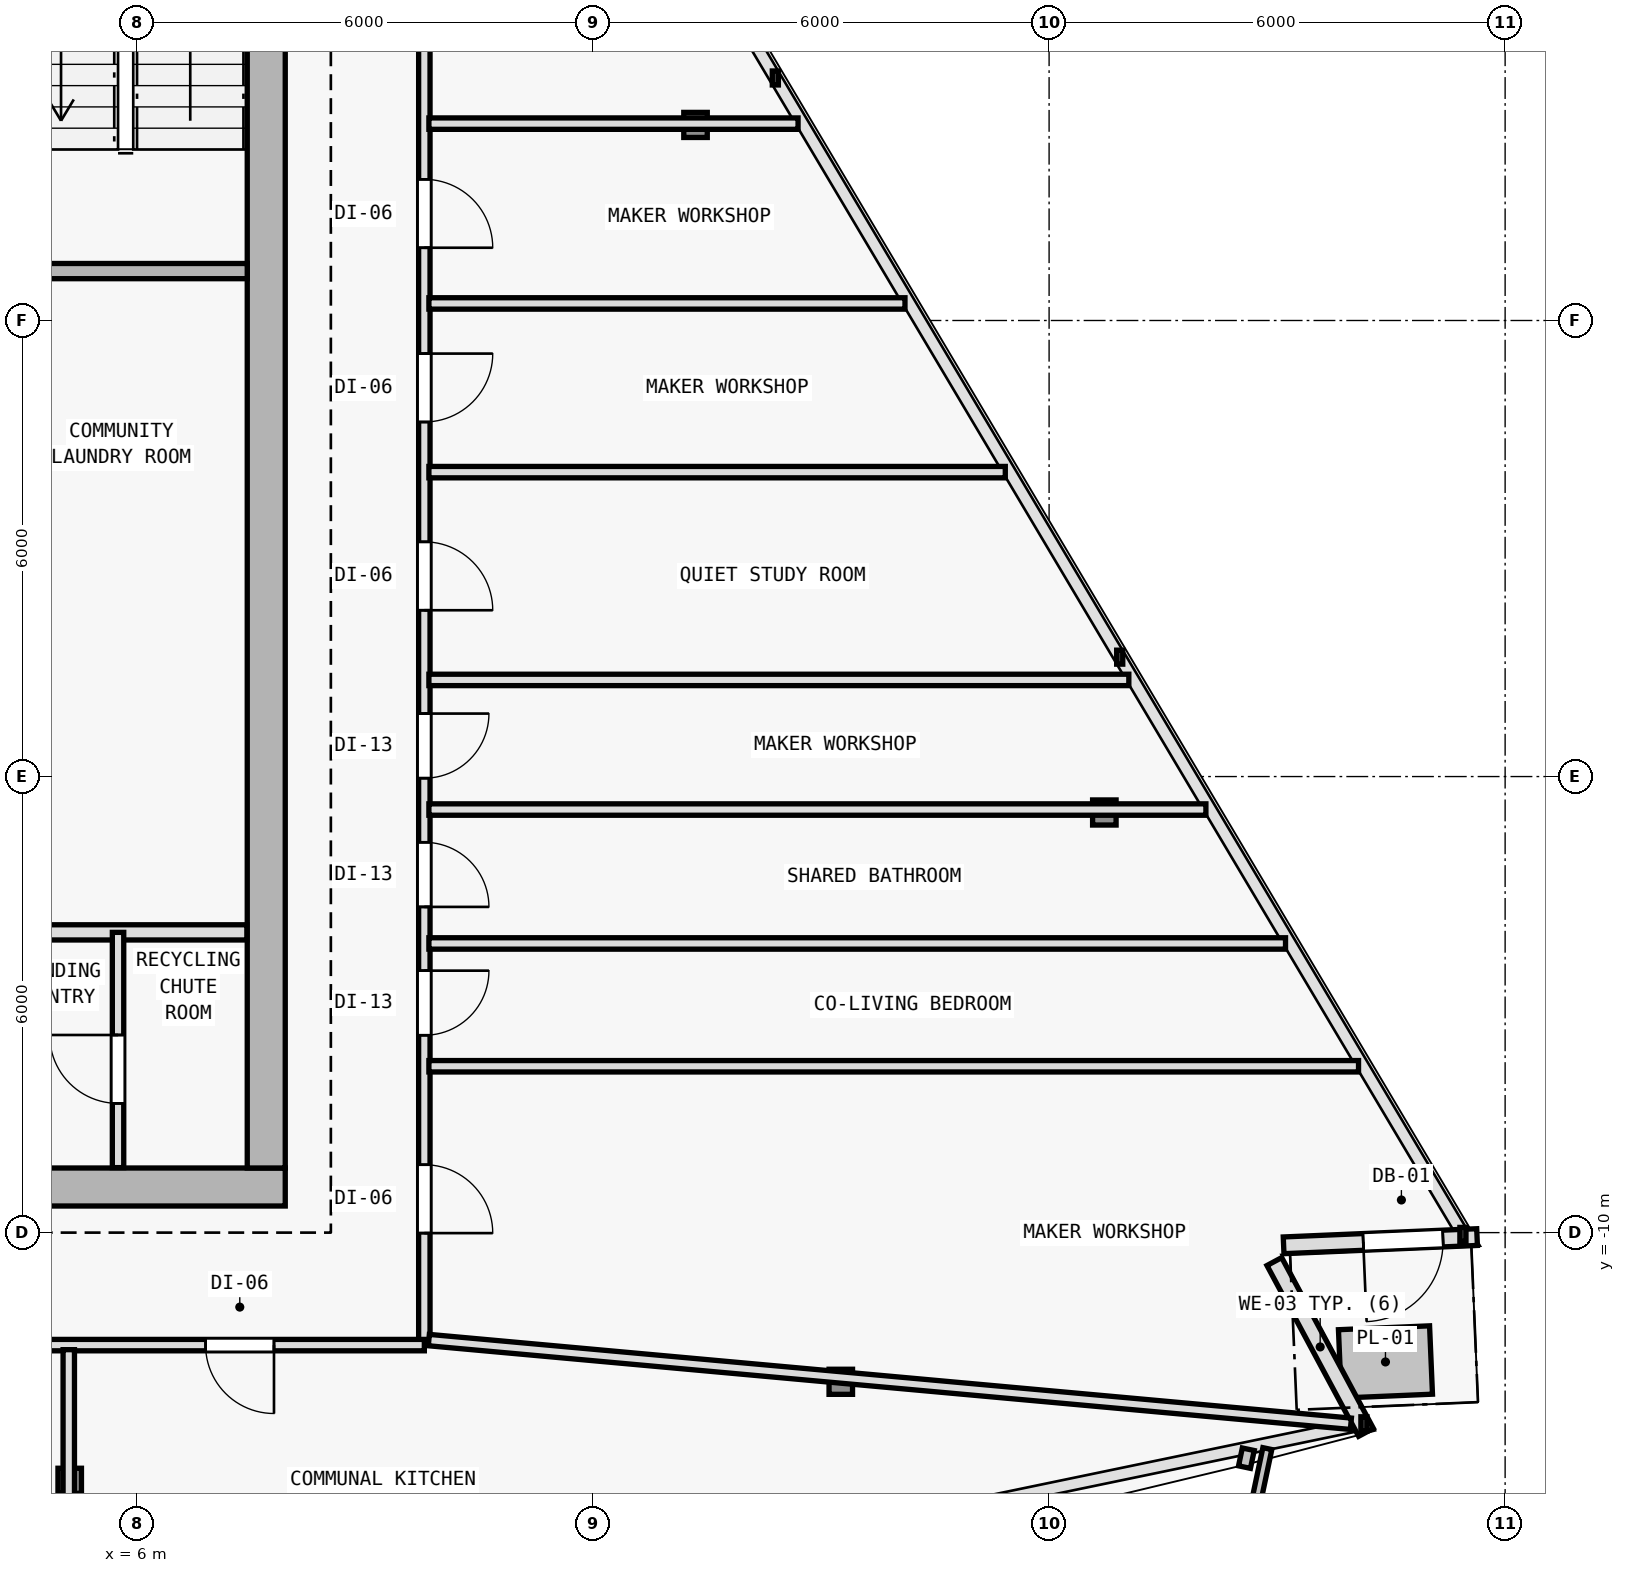
"""IFC4 building model, lengths in metres.
Left out: names, types, materials, properties, quantities, classifications, styles, units other than length and angle.
Written with IfcOpenShell. Run it as: python <this file> out.ifc"""

import sys

from ifc_helpers import new_model, si_unit, direction, frame, frame_2d, origin, origin_2d, place, context, subcontext, project, spatial, rectangle, i_section, extrude, element, fill, save


model = new_model("IFC4")
c1 = context("Model", 3, precision=1e-05, world=origin(), true_north=direction((0.0, 1.0)))
c2 = subcontext(c1, "Body", "Model", "MODEL_VIEW")
j1 = project(units=[si_unit("LENGTHUNIT", "METRE"), si_unit("PLANEANGLEUNIT", "RADIAN")], contexts=[c1])
p1 = place(None, origin())
s1 = spatial("IfcSite", under=j1, at=p1, CompositionType="ELEMENT")
p2 = place(p1, origin())
s2 = spatial("IfcBuilding", under=s1, at=p2, CompositionType="ELEMENT")
p3 = place(p2, frame((0.0, 0.0, 283.2)))
s3 = spatial("IfcBuildingStorey", under=s2, at=p3, CompositionType="ELEMENT", Elevation=283.2)
for number, where, z_axis, x_axis in (
    (1, (7.7, -9.4, 0.0), (0.0, 0.0, 1.0), (1.0, 0.0, 0.0)),
    (2, (7.7, 0.4, 0.0), (0.0, 0.0, 1.0), (1.0, 0.0, 0.0)),
):
    element("IfcColumn", number, at=place(p3, frame(where, z_axis=z_axis, x_axis=x_axis)), inside=s3, PredefinedType="COLUMN", context=c2, shape_type="SweptSolid", body=[
        extrude(i_section(OverallWidth=0.374, OverallDepth=0.372, WebThickness=0.012, FlangeThickness=0.02, FilletRadius=0.015, at=origin_2d()), origin(), (0.0, 0.0, 1.0), 3.6),
    ])
p4 = place(p3, frame((5.114, -13.265, 0.006), z_axis=(-0.006934304776, 0.03521539092, 0.999355688261), x_axis=(-0.981159154887, -0.193201223549, 0.0)))
e3 = element("IfcColumn", 3, at=p4, inside=s3, PredefinedType="COLUMN", context=c2, shape_type="SweptSolid", body=[
    extrude(i_section(OverallWidth=0.309, OverallDepth=0.33, WebThickness=0.011, FlangeThickness=0.019, FilletRadius=0.027, at=origin_2d()), origin(), (0.0, 0.0, 1.0), 3.591),
])
p5 = place(p3, frame((15.259, -11.962, 0.006), z_axis=(-0.020596292833, 0.033511459955, 0.999226087917), x_axis=(-0.851954850327, -0.523615252838, 0.0)))
e4 = element("IfcColumn", 4, at=p5, inside=s3, PredefinedType="COLUMN", context=c2, shape_type="SweptSolid", body=[
    extrude(i_section(OverallWidth=0.309, OverallDepth=0.33, WebThickness=0.011, FlangeThickness=0.019, FilletRadius=0.027, at=origin_2d()), origin(), (0.0, 0.0, 1.0), 3.592),
])
p6 = place(p3, frame((18.727, -4.473, 0.006), z_axis=(-0.026107436898, 0.021620221181, 0.999425318758), x_axis=(-0.637813971185, -0.770190455771, 0.0)))
e5 = element("IfcColumn", 5, at=p6, inside=s3, PredefinedType="COLUMN", context=c2, shape_type="SweptSolid", body=[
    extrude(i_section(OverallWidth=0.309, OverallDepth=0.33, WebThickness=0.011, FlangeThickness=0.019, FilletRadius=0.027, at=origin_2d()), origin(), (0.0, 0.0, 1.0), 3.591),
])
p7 = place(p3, frame((13.348, 4.573, 0.006), z_axis=(-0.018907326549, 0.00952167524, 0.999775900241), x_axis=(-0.449781931574, -0.893138406984, 0.0)))
e6 = element("IfcColumn", 6, at=p7, inside=s3, PredefinedType="COLUMN", context=c2, shape_type="SweptSolid", body=[
    extrude(i_section(OverallWidth=0.309, OverallDepth=0.33, WebThickness=0.011, FlangeThickness=0.019, FilletRadius=0.027, at=origin_2d()), origin(), (0.0, 0.0, 1.0), 3.59),
])
p8 = place(p3, frame((20.964, -10.381, 0.0), z_axis=(0.0, 0.0, 1.0), x_axis=(0.472728849632, -0.881207940685, 0.0)))
e7 = element("IfcWall", 7, at=p8, inside=s3, PredefinedType="SOLIDWALL", context=c2, shape_type="SweptSolid", body=[
    extrude(rectangle(XDim=2.55, YDim=0.22, at=frame_2d((1.275, 0.0))), origin(), (0.0, 0.0, 1.0), 3.35),
])
p9 = place(p3, frame((23.631, -10.059, 0.0), z_axis=(0.0, 0.0, 1.0), x_axis=(-0.999098350703, -0.042455690107, 0.0)))
e8 = element("IfcWall", 8, at=p9, inside=s3, PredefinedType="SOLIDWALL", context=c2, shape_type="SweptSolid", body=[
    extrude(rectangle(XDim=2.547, YDim=0.22, at=frame_2d((1.274, 0.0))), origin(), (0.0, 0.0, 1.0), 3.35),
])
p10 = place(p9, frame((0.449, 0.0, 0.0)))
e9 = element("IfcOpeningElement", 9, at=p10, cuts=e8, PredefinedType="OPENING", context=c2, shape_type="SweptSolid", body=[
    extrude(rectangle(XDim=1.05, YDim=2.15, at=frame_2d((0.525, 1.075))), frame((0.0, 0.12, 0.0), z_axis=(0.0, -1.0, 0.0), x_axis=(1.0, 0.0, 0.0)), (0.0, 0.0, 1.0), 0.24),
])
p11 = place(p3, frame((-7.95, -9.4, 0.0), z_axis=(0.0, 0.0, 1.0), x_axis=(1.0, 0.0, 0.0)))
e10 = element("IfcWall", 10, at=p11, inside=s3, PredefinedType="SHEAR", context=c2, shape_type="SweptSolid", body=[
    extrude(rectangle(XDim=15.9, YDim=0.5, at=frame_2d((7.95, 0.0))), origin(), (0.0, 0.0, 1.0), 3.35),
])
p12 = place(p11, frame((9.6, 0.0, 0.0)))
e11 = element("IfcOpeningElement", 11, at=p12, cuts=e10, PredefinedType="OPENING", context=c2, shape_type="SweptSolid", body=[
    extrude(rectangle(XDim=1.5, YDim=2.2, at=frame_2d((0.75, 1.1))), frame((0.0, 0.26, 0.0), z_axis=(0.0, -1.0, 0.0), x_axis=(1.0, 0.0, 0.0)), (0.0, 0.0, 1.0), 0.52),
])
p13 = place(p3, frame((7.7, 9.95, 0.0), z_axis=(0.0, 0.0, 1.0), x_axis=(0.0, -1.0, 0.0)))
e12 = element("IfcWall", 12, at=p13, inside=s3, PredefinedType="SHEAR", context=c2, shape_type="SweptSolid", body=[
    extrude(rectangle(XDim=19.1, YDim=0.5, at=frame_2d((9.55, 0.0))), origin(), (0.0, 0.0, 1.0), 3.35),
])
p14 = place(p3, frame((4.05, 2.65, 0.0), z_axis=(0.0, 0.0, 1.0), x_axis=(1.0, 0.0, 0.0)))
e13 = element("IfcWall", 13, at=p14, inside=s3, PredefinedType="SOLIDWALL", context=c2, shape_type="SweptSolid", body=[
    extrude(rectangle(XDim=3.4, YDim=0.2, at=frame_2d((1.7, 0.0))), origin(), (0.0, 0.0, 1.0), 3.35),
])
p15 = place(p3, frame((4.15, -6.05, 0.0), z_axis=(0.0, 0.0, 1.0), x_axis=(1.0, 0.0, 0.0)))
e14 = element("IfcWall", 14, at=p15, inside=s3, PredefinedType="SOLIDWALL", context=c2, shape_type="SweptSolid", body=[
    extrude(rectangle(XDim=3.295, YDim=0.2, at=frame_2d((1.647, 0.0))), origin(), (0.0, 0.0, 1.0), 3.35),
])
p16 = place(p3, frame((5.75, -9.145, 0.0), z_axis=(0.0, 0.0, 1.0), x_axis=(0.0, 1.0, 0.0)))
e15 = element("IfcWall", 15, at=p16, inside=s3, PredefinedType="PARTITIONING", context=c2, shape_type="SweptSolid", body=[
    extrude(rectangle(XDim=3.095, YDim=0.15, at=frame_2d((1.547, 0.0))), origin(), (0.0, 0.0, 1.0), 3.35),
])
p17 = place(p16, frame((0.845, 0.0, 0.0)))
e16 = element("IfcOpeningElement", 16, at=p17, cuts=e15, PredefinedType="OPENING", context=c2, shape_type="SweptSolid", body=[
    extrude(rectangle(XDim=0.9, YDim=2.1, at=frame_2d((0.45, 1.05))), frame((0.0, 0.085, 0.0), z_axis=(0.0, -1.0, 0.0), x_axis=(1.0, 0.0, 0.0)), (0.0, 0.0, 1.0), 0.17),
])
p18 = place(p3, frame((9.78, 8.226, 0.0), z_axis=(0.0, 0.0, 1.0), x_axis=(0.0, -1.0, 0.0)))
e17 = element("IfcWall", 17, at=p18, inside=s3, PredefinedType="PARTITIONING", context=c2, shape_type="SweptSolid", body=[
    extrude(rectangle(XDim=19.706, YDim=0.15, at=frame_2d((9.853, 0.0))), origin(), (0.0, 0.0, 1.0), 2.775),
])
p19 = place(p18, frame((17.333, 0.0, 0.0)))
e18 = element("IfcOpeningElement", 18, at=p19, cuts=e17, PredefinedType="OPENING", context=c2, shape_type="SweptSolid", body=[
    extrude(rectangle(XDim=0.9, YDim=2.1, at=frame_2d((0.45, 1.05))), frame((0.0, 0.085, 0.0), z_axis=(0.0, -1.0, 0.0), x_axis=(1.0, 0.0, 0.0)), (0.0, 0.0, 1.0), 0.17),
])
p20 = place(p18, frame((14.78, 0.0, 0.0)))
e19 = element("IfcOpeningElement", 19, at=p20, cuts=e17, PredefinedType="OPENING", context=c2, shape_type="SweptSolid", body=[
    extrude(rectangle(XDim=0.85, YDim=2.1, at=frame_2d((0.425, 1.05))), frame((0.0, 0.085, 0.0), z_axis=(0.0, -1.0, 0.0), x_axis=(1.0, 0.0, 0.0)), (0.0, 0.0, 1.0), 0.17),
])
p21 = place(p18, frame((13.091, 0.0, 0.0)))
e20 = element("IfcOpeningElement", 20, at=p21, cuts=e17, PredefinedType="OPENING", context=c2, shape_type="SweptSolid", body=[
    extrude(rectangle(XDim=0.85, YDim=2.1, at=frame_2d((0.425, 1.05))), frame((0.0, 0.085, 0.0), z_axis=(0.0, -1.0, 0.0), x_axis=(1.0, 0.0, 0.0)), (0.0, 0.0, 1.0), 0.17),
])
p22 = place(p18, frame((11.397, 0.0, 0.0)))
e21 = element("IfcOpeningElement", 21, at=p22, cuts=e17, PredefinedType="OPENING", context=c2, shape_type="SweptSolid", body=[
    extrude(rectangle(XDim=0.85, YDim=2.1, at=frame_2d((0.425, 1.05))), frame((0.0, 0.085, 0.0), z_axis=(0.0, -1.0, 0.0), x_axis=(1.0, 0.0, 0.0)), (0.0, 0.0, 1.0), 0.17),
])
p23 = place(p18, frame((9.138, 0.0, 0.0)))
e22 = element("IfcOpeningElement", 22, at=p23, cuts=e17, PredefinedType="OPENING", context=c2, shape_type="SweptSolid", body=[
    extrude(rectangle(XDim=0.9, YDim=2.1, at=frame_2d((0.45, 1.05))), frame((0.0, 0.085, 0.0), z_axis=(0.0, -1.0, 0.0), x_axis=(1.0, 0.0, 0.0)), (0.0, 0.0, 1.0), 0.17),
])
p24 = place(p18, frame((6.661, 0.0, 0.0)))
e23 = element("IfcOpeningElement", 23, at=p24, cuts=e17, PredefinedType="OPENING", context=c2, shape_type="SweptSolid", body=[
    extrude(rectangle(XDim=0.9, YDim=2.1, at=frame_2d((0.45, 1.05))), frame((0.0, 0.085, 0.0), z_axis=(0.0, -1.0, 0.0), x_axis=(1.0, 0.0, 0.0)), (0.0, 0.0, 1.0), 0.17),
])
p25 = place(p18, frame((4.369, 0.0, 0.0)))
e24 = element("IfcOpeningElement", 24, at=p25, cuts=e17, PredefinedType="OPENING", context=c2, shape_type="SweptSolid", body=[
    extrude(rectangle(XDim=0.9, YDim=2.1, at=frame_2d((0.45, 1.05))), frame((0.0, 0.085, 0.0), z_axis=(0.0, -1.0, 0.0), x_axis=(1.0, 0.0, 0.0)), (0.0, 0.0, 1.0), 0.17),
])
p26 = place(p3, frame((9.78, -11.48, 0.0), z_axis=(0.0, 0.0, 1.0), x_axis=(-1.0, 0.0, 0.0)))
e25 = element("IfcWall", 25, at=p26, inside=s3, PredefinedType="PARTITIONING", context=c2, shape_type="SweptSolid", body=[
    extrude(rectangle(XDim=19.56, YDim=0.15, at=frame_2d((9.78, 0.0))), origin(), (0.0, 0.0, 1.0), 2.925),
])
p27 = place(p26, frame((11.58, 0.0, 0.0)))
e26 = element("IfcOpeningElement", 26, at=p27, cuts=e25, PredefinedType="OPENING", context=c2, shape_type="SweptSolid", body=[
    extrude(rectangle(XDim=0.9, YDim=2.1, at=frame_2d((0.45, 1.05))), frame((0.0, 0.085, 0.0), z_axis=(0.0, -1.0, 0.0), x_axis=(1.0, 0.0, 0.0)), (0.0, 0.0, 1.0), 0.17),
])
p28 = place(p26, frame((1.978, 0.0, 0.0)))
e27 = element("IfcOpeningElement", 27, at=p28, cuts=e25, PredefinedType="OPENING", context=c2, shape_type="SweptSolid", body=[
    extrude(rectangle(XDim=0.9, YDim=2.1, at=frame_2d((0.45, 1.05))), frame((0.0, 0.085, 0.0), z_axis=(0.0, -1.0, 0.0), x_axis=(1.0, 0.0, 0.0)), (0.0, 0.0, 1.0), 0.17),
])
p29 = place(p3, frame((5.102, -11.54, 0.0), z_axis=(0.0, 0.0, 1.0), x_axis=(0.0, -1.0, 0.0)))
e28 = element("IfcWall", 28, at=p29, inside=s3, PredefinedType="PARTITIONING", context=c2, shape_type="SweptSolid", body=[
    extrude(rectangle(XDim=3.724, YDim=0.15, at=frame_2d((1.862, 0.0))), origin(), (0.0, 0.0, 1.0), 2.775),
])
p30 = place(p3, frame((9.839, -11.414, 0.0), z_axis=(0.0, 0.0, 1.0), x_axis=(0.995906502278, -0.09038937283, 0.0)))
e29 = element("IfcWall", 29, at=p30, inside=s3, PredefinedType="PARTITIONING", context=c2, shape_type="SweptSolid", body=[
    extrude(rectangle(XDim=12.181, YDim=0.15, at=frame_2d((6.091, 0.0))), origin(), (0.0, 0.0, 1.0), 3.015),
])
p31 = place(p3, frame((9.84, -4.434, 0.0), z_axis=(0.0, 0.0, 1.0), x_axis=(1.0, 0.0, 0.0)))
e30 = element("IfcWall", 30, at=p31, inside=s3, PredefinedType="PARTITIONING", context=c2, shape_type="SweptSolid", body=[
    extrude(rectangle(XDim=10.223, YDim=0.15, at=frame_2d((5.111, 0.0))), origin(), (0.0, 0.0, 1.0), 2.725),
])
p32 = place(p3, frame((9.84, 4.59, 0.0), z_axis=(0.0, 0.0, 1.0), x_axis=(1.0, 0.0, 0.0)))
e31 = element("IfcWall", 31, at=p32, inside=s3, PredefinedType="PARTITIONING", context=c2, shape_type="SweptSolid", body=[
    extrude(rectangle(XDim=4.857, YDim=0.15, at=frame_2d((2.428, 0.0))), origin(), (0.0, 0.0, 1.0), 2.775),
])
p33 = place(p3, frame((9.84, -7.811, 0.0), z_axis=(0.0, 0.0, 1.0), x_axis=(1.0, 0.0, 0.0)))
e32 = element("IfcWall", 32, at=p33, inside=s3, PredefinedType="PARTITIONING", context=c2, shape_type="SweptSolid", body=[
    extrude(rectangle(XDim=12.231, YDim=0.15, at=frame_2d((6.116, 0.0))), origin(), (0.0, 0.0, 1.0), 2.825),
])
p34 = place(p3, frame((9.84, 0.005, 0.0), z_axis=(0.0, 0.0, 1.0), x_axis=(1.0, 0.0, 0.0)))
e33 = element("IfcWall", 33, at=p34, inside=s3, PredefinedType="PARTITIONING", context=c2, shape_type="SweptSolid", body=[
    extrude(rectangle(XDim=7.583, YDim=0.15, at=frame_2d((3.792, 0.0))), origin(), (0.0, 0.0, 1.0), 2.725),
])
p35 = place(p3, frame((9.84, -6.196, 0.0), z_axis=(0.0, 0.0, 1.0), x_axis=(1.0, 0.0, 0.0)))
e34 = element("IfcWall", 34, at=p35, inside=s3, PredefinedType="PARTITIONING", context=c2, shape_type="SweptSolid", body=[
    extrude(rectangle(XDim=11.271, YDim=0.15, at=frame_2d((5.635, 0.0))), origin(), (0.0, 0.0, 1.0), 2.725),
])
p36 = place(p3, frame((9.84, -2.729, 0.0), z_axis=(0.0, 0.0, 1.0), x_axis=(1.0, 0.0, 0.0)))
e35 = element("IfcWall", 35, at=p36, inside=s3, PredefinedType="PARTITIONING", context=c2, shape_type="SweptSolid", body=[
    extrude(rectangle(XDim=9.209, YDim=0.15, at=frame_2d((4.604, 0.0))), origin(), (0.0, 0.0, 1.0), 2.725),
])
p37 = place(p3, frame((9.84, 2.224, 0.0), z_axis=(0.0, 0.0, 1.0), x_axis=(1.0, 0.0, 0.0)))
e36 = element("IfcWall", 36, at=p37, inside=s3, PredefinedType="PARTITIONING", context=c2, shape_type="SweptSolid", body=[
    extrude(rectangle(XDim=6.264, YDim=0.15, at=frame_2d((3.132, 0.0))), origin(), (0.0, 0.0, 1.0), 2.725),
])
p38 = place(p10, origin())
e37 = element("IfcDoor", 37, at=p38, inside=s3, OperationType="SINGLE_SWING_RIGHT", PredefinedType="DOOR", context=c2, shape_type="SweptSolid", body=[
    extrude(rectangle(XDim=1.05, YDim=2.15, at=frame_2d((0.525, 1.075))), frame((0.0, 0.025, 0.0), z_axis=(0.0, -1.0, 0.0), x_axis=(1.0, 0.0, 0.0)), (0.0, 0.0, 1.0), 0.05),
])
fill(e9, e37)
p39 = place(p17, origin())
e38 = element("IfcDoor", 38, at=p39, inside=s3, OperationType="SINGLE_SWING_RIGHT", PredefinedType="DOOR", context=c2, shape_type="SweptSolid", body=[
    extrude(rectangle(XDim=0.9, YDim=2.1, at=frame_2d((0.45, 1.05))), frame((0.0, 0.025, 0.0), z_axis=(0.0, -1.0, 0.0), x_axis=(1.0, 0.0, 0.0)), (0.0, 0.0, 1.0), 0.05),
])
fill(e16, e38)
p40 = place(p28, origin())
e39 = element("IfcDoor", 39, at=p40, inside=s3, OperationType="SINGLE_SWING_LEFT", PredefinedType="DOOR", context=c2, shape_type="SweptSolid", body=[
    extrude(rectangle(XDim=0.9, YDim=2.1, at=frame_2d((0.45, 1.05))), frame((0.0, 0.025, 0.0), z_axis=(0.0, -1.0, 0.0), x_axis=(1.0, 0.0, 0.0)), (0.0, 0.0, 1.0), 0.05),
])
fill(e27, e39)
p41 = place(p19, origin())
e40 = element("IfcDoor", 40, at=p41, inside=s3, OperationType="SINGLE_SWING_RIGHT", PredefinedType="DOOR", context=c2, shape_type="SweptSolid", body=[
    extrude(rectangle(XDim=0.9, YDim=2.1, at=frame_2d((0.45, 1.05))), frame((0.0, 0.025, 0.0), z_axis=(0.0, -1.0, 0.0), x_axis=(1.0, 0.0, 0.0)), (0.0, 0.0, 1.0), 0.05),
])
fill(e18, e40)
p42 = place(p20, origin())
e41 = element("IfcDoor", 41, at=p42, inside=s3, OperationType="SINGLE_SWING_LEFT", PredefinedType="DOOR", context=c2, shape_type="SweptSolid", body=[
    extrude(rectangle(XDim=0.85, YDim=2.1, at=frame_2d((0.425, 1.05))), frame((0.0, 0.025, 0.0), z_axis=(0.0, -1.0, 0.0), x_axis=(1.0, 0.0, 0.0)), (0.0, 0.0, 1.0), 0.05),
])
fill(e19, e41)
p43 = place(p21, origin())
e42 = element("IfcDoor", 42, at=p43, inside=s3, OperationType="SINGLE_SWING_RIGHT", PredefinedType="DOOR", context=c2, shape_type="SweptSolid", body=[
    extrude(rectangle(XDim=0.85, YDim=2.1, at=frame_2d((0.425, 1.05))), frame((0.0, 0.025, 0.0), z_axis=(0.0, -1.0, 0.0), x_axis=(1.0, 0.0, 0.0)), (0.0, 0.0, 1.0), 0.05),
])
fill(e20, e42)
p44 = place(p22, origin())
e43 = element("IfcDoor", 43, at=p44, inside=s3, OperationType="SINGLE_SWING_LEFT", PredefinedType="DOOR", context=c2, shape_type="SweptSolid", body=[
    extrude(rectangle(XDim=0.85, YDim=2.1, at=frame_2d((0.425, 1.05))), frame((0.0, 0.025, 0.0), z_axis=(0.0, -1.0, 0.0), x_axis=(1.0, 0.0, 0.0)), (0.0, 0.0, 1.0), 0.05),
])
fill(e21, e43)
p45 = place(p23, origin())
e44 = element("IfcDoor", 44, at=p45, inside=s3, OperationType="SINGLE_SWING_RIGHT", PredefinedType="DOOR", context=c2, shape_type="SweptSolid", body=[
    extrude(rectangle(XDim=0.9, YDim=2.1, at=frame_2d((0.45, 1.05))), frame((0.0, 0.025, 0.0), z_axis=(0.0, -1.0, 0.0), x_axis=(1.0, 0.0, 0.0)), (0.0, 0.0, 1.0), 0.05),
])
fill(e22, e44)
p46 = place(p24, origin())
e45 = element("IfcDoor", 45, at=p46, inside=s3, OperationType="SINGLE_SWING_LEFT", PredefinedType="DOOR", context=c2, shape_type="SweptSolid", body=[
    extrude(rectangle(XDim=0.9, YDim=2.1, at=frame_2d((0.45, 1.05))), frame((0.0, 0.025, 0.0), z_axis=(0.0, -1.0, 0.0), x_axis=(1.0, 0.0, 0.0)), (0.0, 0.0, 1.0), 0.05),
])
fill(e23, e45)
p47 = place(p25, origin())
e46 = element("IfcDoor", 46, at=p47, inside=s3, OperationType="SINGLE_SWING_RIGHT", PredefinedType="DOOR", context=c2, shape_type="SweptSolid", body=[
    extrude(rectangle(XDim=0.9, YDim=2.1, at=frame_2d((0.45, 1.05))), frame((0.0, 0.025, 0.0), z_axis=(0.0, -1.0, 0.0), x_axis=(1.0, 0.0, 0.0)), (0.0, 0.0, 1.0), 0.05),
])
fill(e24, e46)
save(model, sys.argv[1])
